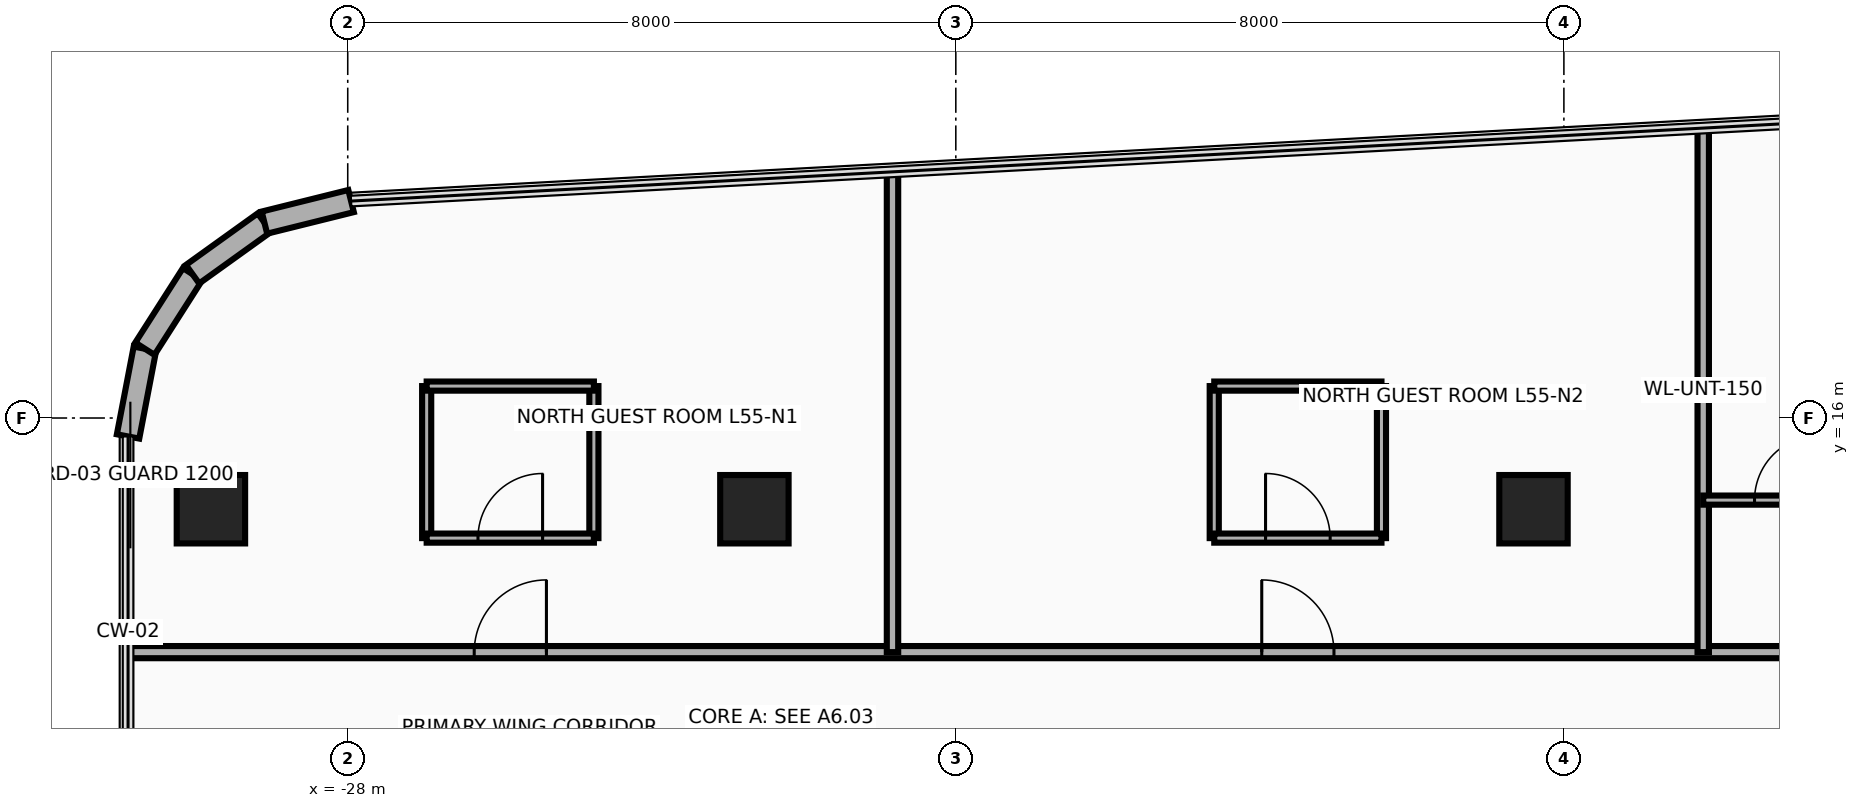
"""IFC4 building model, lengths in metres.
Left out: names, types, materials, properties, quantities, classifications, styles, units other than length and angle.
Written with IfcOpenShell. Run it as: python <this file> out.ifc"""

import sys

from ifc_helpers import new_model, si_unit, direction, frame, frame_2d, origin, origin_2d, place, context, subcontext, project, spatial, rectangle, extrude, source, transform, mapped, element, fill, save


model = new_model("IFC4")
c1 = context("Model", 3, precision=1e-05, world=origin(), true_north=direction((0.0, 1.0)))
c2 = subcontext(c1, "Body", "Model", "MODEL_VIEW")
j1 = project(units=[si_unit("LENGTHUNIT", "METRE"), si_unit("PLANEANGLEUNIT", "RADIAN")], contexts=[c1])
p1 = place(None, origin())
s1 = spatial("IfcSite", under=j1, at=p1, CompositionType="ELEMENT")
p2 = place(p1, origin())
s2 = spatial("IfcBuilding", under=s1, at=p2, CompositionType="ELEMENT")
p3 = place(p2, frame((0.0, 0.0, 216.0)))
s3 = spatial("IfcBuildingStorey", under=s2, at=p3, CompositionType="ELEMENT", Elevation=216.0)
m1 = source(origin(), c2, "Body", "SweptSolid", [
    extrude(rectangle(XDim=0.9, YDim=0.9, at=origin_2d()), origin(), (0.0, 0.0, 1.0), 3.5),
])
for number, where, z_axis, x_axis in (
    (1, (-29.8, 14.8, 0.0), (0.0, 0.0, 1.0), (1.0, 0.0, 0.0)),
    (2, (-22.65, 14.8, 0.0), (0.0, 0.0, 1.0), (1.0, 0.0, 0.0)),
    (3, (-12.4, 14.8, 0.0), (0.0, 0.0, 1.0), (1.0, 0.0, 0.0)),
):
    element("IfcColumn", number, at=place(p3, frame(where, z_axis=z_axis, x_axis=x_axis)), inside=s3, PredefinedType="COLUMN", context=c2, shape_type="MappedRepresentation", body=[
        mapped(m1, transform((0.0, 0.0, 0.0), x_axis=(1.0, 0.0, 0.0), y_axis=(0.0, 1.0, 0.0), z_axis=(0.0, 0.0, 1.0), scale=1.0)),
    ])
p4 = place(p3, frame((-30.89, 15.758, 0.0), z_axis=(0.0, 0.0, 1.0), x_axis=(0.18831542659, 0.982108598938, 0.0)))
e4 = element("IfcWall", 4, at=p4, inside=s3, PredefinedType="SOLIDWALL", context=c2, shape_type="SweptSolid", body=[
    extrude(rectangle(XDim=1.175, YDim=0.3, at=frame_2d((0.587, 0.0))), origin(), (0.0, 0.0, 1.0), 3.26),
])
p5 = place(p3, frame((-30.669, 16.911, 0.0), z_axis=(0.0, 0.0, 1.0), x_axis=(0.538678781902, 0.84251122837, 0.0)))
e5 = element("IfcWall", 5, at=p5, inside=s3, PredefinedType="SOLIDWALL", context=c2, shape_type="SweptSolid", body=[
    extrude(rectangle(XDim=1.164, YDim=0.3, at=frame_2d((0.582, 0.0))), origin(), (0.0, 0.0, 1.0), 3.26),
])
p6 = place(p3, frame((-30.042, 17.892, 0.0), z_axis=(0.0, 0.0, 1.0), x_axis=(0.812313539683, 0.583220981487, 0.0)))
e6 = element("IfcWall", 6, at=p6, inside=s3, PredefinedType="SOLIDWALL", context=c2, shape_type="SweptSolid", body=[
    extrude(rectangle(XDim=1.164, YDim=0.3, at=frame_2d((0.582, 0.0))), origin(), (0.0, 0.0, 1.0), 3.26),
])
p7 = place(p3, frame((-29.096, 18.571, 0.0), z_axis=(0.0, 0.0, 1.0), x_axis=(0.97050812798, 0.241068400098, 0.0)))
e7 = element("IfcWall", 7, at=p7, inside=s3, PredefinedType="SOLIDWALL", context=c2, shape_type="SweptSolid", body=[
    extrude(rectangle(XDim=1.175, YDim=0.3, at=frame_2d((0.587, 0.0))), origin(), (0.0, 0.0, 1.0), 3.26),
])
p8 = place(p3, frame((-30.89, 12.92, 0.0), z_axis=(0.0, 0.0, 1.0), x_axis=(1.0, 0.0, 0.0)))
e8 = element("IfcWall", 8, at=p8, inside=s3, PredefinedType="PARTITIONING", context=c2, shape_type="SweptSolid", body=[
    extrude(rectangle(XDim=31.28, YDim=0.16, at=frame_2d((15.64, 0.0))), origin(), (0.0, 0.0, 1.0), 2.634),
])
p9 = place(p8, frame((4.554, 0.0, 0.0)))
e9 = element("IfcOpeningElement", 9, at=p9, cuts=e8, PredefinedType="OPENING", context=c2, shape_type="SweptSolid", body=[
    extrude(rectangle(XDim=0.95, YDim=2.15, at=frame_2d((0.475, 1.075))), frame((0.0, 0.095, 0.0), z_axis=(0.0, -1.0, 0.0), x_axis=(1.0, 0.0, 0.0)), (0.0, 0.0, 1.0), 0.19),
])
p10 = place(p8, frame((14.915, 0.0, 0.0)))
e10 = element("IfcOpeningElement", 10, at=p10, cuts=e8, PredefinedType="OPENING", context=c2, shape_type="SweptSolid", body=[
    extrude(rectangle(XDim=0.95, YDim=2.15, at=frame_2d((0.475, 1.075))), frame((0.0, 0.095, 0.0), z_axis=(0.0, -1.0, 0.0), x_axis=(1.0, 0.0, 0.0)), (0.0, 0.0, 1.0), 0.19),
])
p11 = place(p8, frame((26.627, 0.0, 0.0)))
e11 = element("IfcOpeningElement", 11, at=p11, cuts=e8, PredefinedType="OPENING", context=c2, shape_type="SweptSolid", body=[
    extrude(rectangle(XDim=0.95, YDim=2.15, at=frame_2d((0.475, 1.075))), frame((0.0, 0.095, 0.0), z_axis=(0.0, -1.0, 0.0), x_axis=(1.0, 0.0, 0.0)), (0.0, 0.0, 1.0), 0.19),
])
p12 = place(p3, frame((-20.833, 12.92, 0.0), z_axis=(0.0, 0.0, 1.0), x_axis=(0.0, 1.0, 0.0)))
e12 = element("IfcWall", 12, at=p12, inside=s3, PredefinedType="PARTITIONING", context=c2, shape_type="SweptSolid", body=[
    extrude(rectangle(XDim=6.319, YDim=0.15, at=frame_2d((3.159, 0.0))), origin(), (0.0, 0.0, 1.0), 2.544),
])
p13 = place(p3, frame((-10.167, 12.92, 0.0), z_axis=(0.0, 0.0, 1.0), x_axis=(0.0, 1.0, 0.0)))
e13 = element("IfcWall", 13, at=p13, inside=s3, PredefinedType="PARTITIONING", context=c2, shape_type="SweptSolid", body=[
    extrude(rectangle(XDim=6.894, YDim=0.15, at=frame_2d((3.447, 0.0))), origin(), (0.0, 0.0, 1.0), 2.544),
])
for number, where, z_axis, x_axis in (
    (14, (-26.961, 14.42, 0.0), (0.0, 0.0, 1.0), (0.0, 1.0, 0.0)),
    (15, (-24.761, 14.42, 0.0), (0.0, 0.0, 1.0), (0.0, 1.0, 0.0)),
):
    element("IfcWall", number, at=place(p3, frame(where, z_axis=z_axis, x_axis=x_axis)), inside=s3, PredefinedType="PARTITIONING", context=c2, shape_type="SweptSolid", body=[
        extrude(rectangle(XDim=2.0, YDim=0.12, at=frame_2d((1.0, 0.0))), origin(), (0.0, 0.0, 1.0), 2.544),
    ])
p14 = place(p3, frame((-26.961, 16.42, 0.0), z_axis=(0.0, 0.0, 1.0), x_axis=(1.0, 0.0, 0.0)))
e16 = element("IfcWall", 16, at=p14, inside=s3, PredefinedType="PARTITIONING", context=c2, shape_type="SweptSolid", body=[
    extrude(rectangle(XDim=2.2, YDim=0.12, at=frame_2d((1.1, 0.0))), origin(), (0.0, 0.0, 1.0), 3.26),
])
p15 = place(p3, frame((-26.961, 14.42, 0.0), z_axis=(0.0, 0.0, 1.0), x_axis=(1.0, 0.0, 0.0)))
e17 = element("IfcWall", 17, at=p15, inside=s3, PredefinedType="PARTITIONING", context=c2, shape_type="SweptSolid", body=[
    extrude(rectangle(XDim=2.2, YDim=0.12, at=frame_2d((1.1, 0.0))), origin(), (0.0, 0.0, 1.0), 3.26),
])
p16 = place(p15, frame((0.675, 0.0, 0.0)))
e18 = element("IfcOpeningElement", 18, at=p16, cuts=e17, PredefinedType="OPENING", context=c2, shape_type="SweptSolid", body=[
    extrude(rectangle(XDim=0.85, YDim=2.1, at=frame_2d((0.425, 1.05))), frame((0.0, 0.075, 0.0), z_axis=(0.0, -1.0, 0.0), x_axis=(1.0, 0.0, 0.0)), (0.0, 0.0, 1.0), 0.15),
])
for number, where, z_axis, x_axis in (
    (19, (-16.6, 14.42, 0.0), (0.0, 0.0, 1.0), (0.0, 1.0, 0.0)),
    (20, (-14.4, 14.42, 0.0), (0.0, 0.0, 1.0), (0.0, 1.0, 0.0)),
):
    element("IfcWall", number, at=place(p3, frame(where, z_axis=z_axis, x_axis=x_axis)), inside=s3, PredefinedType="PARTITIONING", context=c2, shape_type="SweptSolid", body=[
        extrude(rectangle(XDim=2.0, YDim=0.12, at=frame_2d((1.0, 0.0))), origin(), (0.0, 0.0, 1.0), 2.544),
    ])
p17 = place(p3, frame((-16.6, 16.42, 0.0), z_axis=(0.0, 0.0, 1.0), x_axis=(1.0, 0.0, 0.0)))
e21 = element("IfcWall", 21, at=p17, inside=s3, PredefinedType="PARTITIONING", context=c2, shape_type="SweptSolid", body=[
    extrude(rectangle(XDim=2.2, YDim=0.12, at=frame_2d((1.1, 0.0))), origin(), (0.0, 0.0, 1.0), 3.26),
])
p18 = place(p3, frame((-16.6, 14.42, 0.0), z_axis=(0.0, 0.0, 1.0), x_axis=(1.0, 0.0, 0.0)))
e22 = element("IfcWall", 22, at=p18, inside=s3, PredefinedType="PARTITIONING", context=c2, shape_type="SweptSolid", body=[
    extrude(rectangle(XDim=2.2, YDim=0.12, at=frame_2d((1.1, 0.0))), origin(), (0.0, 0.0, 1.0), 3.26),
])
p19 = place(p18, frame((0.675, 0.0, 0.0)))
e23 = element("IfcOpeningElement", 23, at=p19, cuts=e22, PredefinedType="OPENING", context=c2, shape_type="SweptSolid", body=[
    extrude(rectangle(XDim=0.85, YDim=2.1, at=frame_2d((0.425, 1.05))), frame((0.0, 0.075, 0.0), z_axis=(0.0, -1.0, 0.0), x_axis=(1.0, 0.0, 0.0)), (0.0, 0.0, 1.0), 0.15),
])
p20 = place(p3, frame((-10.167, 14.92, 0.0), z_axis=(0.0, 0.0, 1.0), x_axis=(1.0, 0.0, 0.0)))
e24 = element("IfcWall", 24, at=p20, inside=s3, PredefinedType="PARTITIONING", context=c2, shape_type="SweptSolid", body=[
    extrude(rectangle(XDim=2.2, YDim=0.12, at=frame_2d((1.1, 0.0))), origin(), (0.0, 0.0, 1.0), 2.544),
])
p21 = place(p20, frame((0.675, 0.0, 0.0)))
e25 = element("IfcOpeningElement", 25, at=p21, cuts=e24, PredefinedType="OPENING", context=c2, shape_type="SweptSolid", body=[
    extrude(rectangle(XDim=0.85, YDim=2.1, at=frame_2d((0.425, 1.05))), frame((0.0, 0.075, 0.0), z_axis=(0.0, -1.0, 0.0), x_axis=(1.0, 0.0, 0.0)), (0.0, 0.0, 1.0), 0.15),
])
p22 = place(p9, origin())
e26 = element("IfcDoor", 26, at=p22, inside=s3, OperationType="SINGLE_SWING_RIGHT", PredefinedType="DOOR", context=c2, shape_type="SweptSolid", body=[
    extrude(rectangle(XDim=0.95, YDim=2.15, at=frame_2d((0.475, 1.075))), frame((0.0, 0.025, 0.0), z_axis=(0.0, -1.0, 0.0), x_axis=(1.0, 0.0, 0.0)), (0.0, 0.0, 1.0), 0.05),
])
fill(e9, e26)
p23 = place(p16, origin())
e27 = element("IfcDoor", 27, at=p23, inside=s3, OperationType="SINGLE_SWING_LEFT", PredefinedType="DOOR", context=c2, shape_type="SweptSolid", body=[
    extrude(rectangle(XDim=0.85, YDim=2.1, at=frame_2d((0.425, 1.05))), frame((0.0, 0.025, 0.0), z_axis=(0.0, -1.0, 0.0), x_axis=(1.0, 0.0, 0.0)), (0.0, 0.0, 1.0), 0.05),
])
fill(e18, e27)
p24 = place(p10, origin())
e28 = element("IfcDoor", 28, at=p24, inside=s3, OperationType="SINGLE_SWING_RIGHT", PredefinedType="DOOR", context=c2, shape_type="SweptSolid", body=[
    extrude(rectangle(XDim=0.95, YDim=2.15, at=frame_2d((0.475, 1.075))), frame((0.0, 0.025, 0.0), z_axis=(0.0, -1.0, 0.0), x_axis=(1.0, 0.0, 0.0)), (0.0, 0.0, 1.0), 0.05),
])
fill(e10, e28)
p25 = place(p19, origin())
e29 = element("IfcDoor", 29, at=p25, inside=s3, OperationType="SINGLE_SWING_LEFT", PredefinedType="DOOR", context=c2, shape_type="SweptSolid", body=[
    extrude(rectangle(XDim=0.85, YDim=2.1, at=frame_2d((0.425, 1.05))), frame((0.0, 0.025, 0.0), z_axis=(0.0, -1.0, 0.0), x_axis=(1.0, 0.0, 0.0)), (0.0, 0.0, 1.0), 0.05),
])
fill(e23, e29)
p26 = place(p21, origin())
e30 = element("IfcDoor", 30, at=p26, inside=s3, OperationType="SINGLE_SWING_LEFT", PredefinedType="DOOR", context=c2, shape_type="SweptSolid", body=[
    extrude(rectangle(XDim=0.85, YDim=2.1, at=frame_2d((0.425, 1.05))), frame((0.0, 0.025, 0.0), z_axis=(0.0, -1.0, 0.0), x_axis=(1.0, 0.0, 0.0)), (0.0, 0.0, 1.0), 0.05),
])
fill(e25, e30)
save(model, sys.argv[1])
